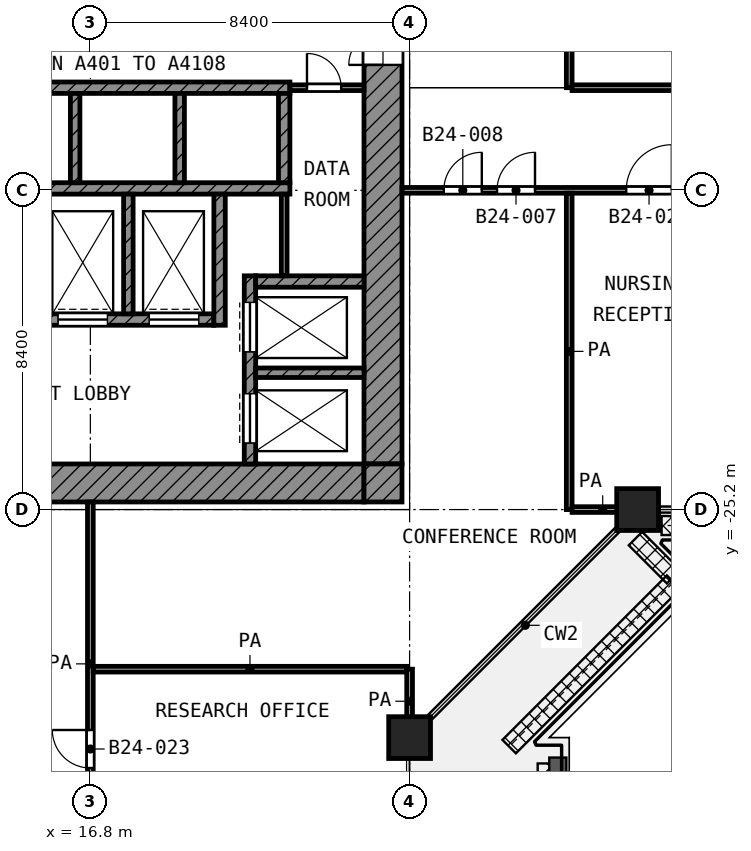
"""IFC4 building model, lengths in metres.
Left out: names, types, materials, properties, quantities, classifications, styles, units other than length and angle.
Written with IfcOpenShell. Run it as: python <this file> out.ifc"""

import sys

from ifc_helpers import new_model, si_unit, direction, frame, frame_2d, origin, origin_2d, place, context, subcontext, project, spatial, rectangle, extrude, element, fill, save


model = new_model("IFC4")
c1 = context("Model", 3, precision=1e-05, world=origin(), true_north=direction((0.0, 1.0)))
c2 = subcontext(c1, "Body", "Model", "MODEL_VIEW")
j1 = project(units=[si_unit("LENGTHUNIT", "METRE"), si_unit("PLANEANGLEUNIT", "RADIAN")], contexts=[c1])
p1 = place(None, origin())
s1 = spatial("IfcSite", under=j1, at=p1, CompositionType="ELEMENT")
p2 = place(p1, origin())
s2 = spatial("IfcBuilding", under=s1, at=p2, CompositionType="ELEMENT")
p3 = place(p2, frame((0.0, 0.0, 107.2)))
s3 = spatial("IfcBuildingStorey", under=s2, at=p3, CompositionType="ELEMENT", Elevation=107.2)
for number, where, z_axis, x_axis in (
    (1, (31.2, -25.2, 0.0), (0.0, 0.0, 1.0), (1.0, 0.0, 0.0)),
    (2, (25.2, -31.2, 0.0), (0.0, 0.0, 1.0), (1.0, 0.0, 0.0)),
):
    element("IfcColumn", number, at=place(p3, frame(where, z_axis=z_axis, x_axis=x_axis)), inside=s3, PredefinedType="COLUMN", context=c2, shape_type="SweptSolid", body=[
        extrude(rectangle(XDim=1.1, YDim=1.1, at=origin_2d()), origin(), (0.0, 0.0, 1.0), 4.2),
    ])
p4 = place(p3, frame((24.5, -24.0, 0.0), z_axis=(0.0, 0.0, 1.0), x_axis=(0.0, 1.0, 0.0)))
e3 = element("IfcWall", 3, at=p4, inside=s3, PredefinedType="SHEAR", context=c2, shape_type="SweptSolid", body=[
    extrude(rectangle(XDim=18.6, YDim=1.0, at=frame_2d((9.3, 0.0))), origin(), (0.0, 0.0, 1.0), 3.6),
])
p5 = place(p4, frame((10.5, 0.0, 0.0)))
e4 = element("IfcOpeningElement", 4, at=p5, cuts=e3, PredefinedType="OPENING", context=c2, shape_type="SweptSolid", body=[
    extrude(rectangle(XDim=1.8, YDim=2.1, at=frame_2d((0.9, 1.05))), frame((0.0, 0.51, 0.0), z_axis=(0.0, -1.0, 0.0), x_axis=(1.0, 0.0, 0.0)), (0.0, 0.0, 1.0), 1.02),
])
p6 = place(p3, frame((5.4, -24.5, 0.0), z_axis=(0.0, 0.0, 1.0), x_axis=(1.0, 0.0, 0.0)))
e5 = element("IfcWall", 5, at=p6, inside=s3, PredefinedType="SHEAR", context=c2, shape_type="SweptSolid", body=[
    extrude(rectangle(XDim=18.6, YDim=1.0, at=frame_2d((9.3, 0.0))), origin(), (0.0, 0.0, 1.0), 3.6),
])
p7 = place(p6, frame((6.3, 0.0, 0.0)))
e6 = element("IfcOpeningElement", 6, at=p7, cuts=e5, PredefinedType="OPENING", context=c2, shape_type="SweptSolid", body=[
    extrude(rectangle(XDim=1.8, YDim=2.1, at=frame_2d((0.9, 1.05))), frame((0.0, 0.51, 0.0), z_axis=(0.0, -1.0, 0.0), x_axis=(1.0, 0.0, 0.0)), (0.0, 0.0, 1.0), 1.02),
])
p8 = place(p3, frame((24.5, -25.0, 0.0), z_axis=(0.0, 0.0, 1.0), x_axis=(0.0, 1.0, 0.0)))
e7 = element("IfcWall", 7, at=p8, inside=s3, PredefinedType="SHEAR", context=c2, shape_type="SweptSolid", body=[
    extrude(rectangle(XDim=1.0, YDim=1.0, at=frame_2d((0.5, 0.0))), origin(), (0.0, 0.0, 1.0), 3.6),
])
for number, where, z_axis, x_axis in (
    (8, (5.4, -14.1, 0.0), (0.0, 0.0, 1.0), (1.0, 0.0, 0.0)),
    (9, (5.4, -16.75, 0.0), (0.0, 0.0, 1.0), (1.0, 0.0, 0.0)),
):
    element("IfcWall", number, at=place(p3, frame(where, z_axis=z_axis, x_axis=x_axis)), inside=s3, PredefinedType="SHEAR", context=c2, shape_type="SweptSolid", body=[
        extrude(rectangle(XDim=16.65, YDim=0.3, at=frame_2d((8.325, 0.0))), origin(), (0.0, 0.0, 1.0), 3.6),
    ])
p9 = place(p3, frame((5.4, -20.2, 0.0), z_axis=(0.0, 0.0, 1.0), x_axis=(1.0, 0.0, 0.0)))
e10 = element("IfcWall", 10, at=p9, inside=s3, PredefinedType="SHEAR", context=c2, shape_type="SweptSolid", body=[
    extrude(rectangle(XDim=14.65, YDim=0.3, at=frame_2d((7.325, 0.0))), origin(), (0.0, 0.0, 1.0), 3.6),
])
p10 = place(p9, frame((10.55, 0.0, 0.0)))
e11 = element("IfcOpeningElement", 11, at=p10, cuts=e10, PredefinedType="OPENING", context=c2, shape_type="SweptSolid", body=[
    extrude(rectangle(XDim=1.3, YDim=2.1, at=frame_2d((0.65, 1.05))), frame((0.0, 0.16, 0.0), z_axis=(0.0, -1.0, 0.0), x_axis=(1.0, 0.0, 0.0)), (0.0, 0.0, 1.0), 0.32),
])
p11 = place(p9, frame((12.95, 0.0, 0.0)))
e12 = element("IfcOpeningElement", 12, at=p11, cuts=e10, PredefinedType="OPENING", context=c2, shape_type="SweptSolid", body=[
    extrude(rectangle(XDim=1.3, YDim=2.1, at=frame_2d((0.65, 1.05))), frame((0.0, 0.16, 0.0), z_axis=(0.0, -1.0, 0.0), x_axis=(1.0, 0.0, 0.0)), (0.0, 0.0, 1.0), 0.32),
])
p12 = place(p9, frame((0.55, 0.0, 0.0)))
e13 = element("IfcOpeningElement", 13, at=p12, cuts=e10, PredefinedType="OPENING", context=c2, shape_type="SweptSolid", body=[
    extrude(rectangle(XDim=1.3, YDim=2.1, at=frame_2d((0.65, 1.05))), frame((0.0, 0.16, 0.0), z_axis=(0.0, -1.0, 0.0), x_axis=(1.0, 0.0, 0.0)), (0.0, 0.0, 1.0), 0.32),
])
p13 = place(p9, frame((2.95, 0.0, 0.0)))
e14 = element("IfcOpeningElement", 14, at=p13, cuts=e10, PredefinedType="OPENING", context=c2, shape_type="SweptSolid", body=[
    extrude(rectangle(XDim=1.3, YDim=2.1, at=frame_2d((0.65, 1.05))), frame((0.0, 0.16, 0.0), z_axis=(0.0, -1.0, 0.0), x_axis=(1.0, 0.0, 0.0)), (0.0, 0.0, 1.0), 0.32),
])
p14 = place(p9, frame((5.35, 0.0, 0.0)))
e15 = element("IfcOpeningElement", 15, at=p14, cuts=e10, PredefinedType="OPENING", context=c2, shape_type="SweptSolid", body=[
    extrude(rectangle(XDim=0.9, YDim=2.1, at=frame_2d((0.45, 1.05))), frame((0.0, 0.16, 0.0), z_axis=(0.0, -1.0, 0.0), x_axis=(1.0, 0.0, 0.0)), (0.0, 0.0, 1.0), 0.32),
])
p15 = place(p9, frame((7.75, 0.0, 0.0)))
e16 = element("IfcOpeningElement", 16, at=p15, cuts=e10, PredefinedType="OPENING", context=c2, shape_type="SweptSolid", body=[
    extrude(rectangle(XDim=0.9, YDim=2.1, at=frame_2d((0.45, 1.05))), frame((0.0, 0.16, 0.0), z_axis=(0.0, -1.0, 0.0), x_axis=(1.0, 0.0, 0.0)), (0.0, 0.0, 1.0), 0.32),
])
p16 = place(p3, frame((20.2, -20.35, 0.0), z_axis=(0.0, 0.0, 1.0), x_axis=(0.0, 1.0, 0.0)))
e17 = element("IfcWall", 17, at=p16, inside=s3, PredefinedType="SHEAR", context=c2, shape_type="SweptSolid", body=[
    extrude(rectangle(XDim=3.45, YDim=0.3, at=frame_2d((1.725, 0.0))), origin(), (0.0, 0.0, 1.0), 3.6),
])
p17 = place(p3, frame((21.9, -16.6, 0.0), z_axis=(0.0, 0.0, 1.0), x_axis=(0.0, 1.0, 0.0)))
e18 = element("IfcWall", 18, at=p17, inside=s3, PredefinedType="SHEAR", context=c2, shape_type="SweptSolid", body=[
    extrude(rectangle(XDim=2.35, YDim=0.3, at=frame_2d((1.175, 0.0))), origin(), (0.0, 0.0, 1.0), 3.6),
])
p18 = place(p3, frame((21.15, -19.2, 0.0), z_axis=(0.0, 0.0, 1.0), x_axis=(1.0, 0.0, 0.0)))
e19 = element("IfcWall", 19, at=p18, inside=s3, PredefinedType="SHEAR", context=c2, shape_type="SweptSolid", body=[
    extrude(rectangle(XDim=2.85, YDim=0.3, at=frame_2d((1.425, 0.0))), origin(), (0.0, 0.0, 1.0), 3.6),
])
p19 = place(p3, frame((21.0, -24.0, 0.0), z_axis=(0.0, 0.0, 1.0), x_axis=(0.0, 1.0, 0.0)))
e20 = element("IfcWall", 20, at=p19, inside=s3, PredefinedType="SHEAR", context=c2, shape_type="SweptSolid", body=[
    extrude(rectangle(XDim=4.95, YDim=0.3, at=frame_2d((2.475, 0.0))), origin(), (0.0, 0.0, 1.0), 3.6),
])
p20 = place(p19, frame((2.95, 0.0, 0.0)))
e21 = element("IfcOpeningElement", 21, at=p20, cuts=e20, PredefinedType="OPENING", context=c2, shape_type="SweptSolid", body=[
    extrude(rectangle(XDim=1.3, YDim=2.1, at=frame_2d((0.65, 1.05))), frame((0.0, 0.16, 0.0), z_axis=(0.0, -1.0, 0.0), x_axis=(1.0, 0.0, 0.0)), (0.0, 0.0, 1.0), 0.32),
])
p21 = place(p19, frame((0.55, 0.0, 0.0)))
e22 = element("IfcOpeningElement", 22, at=p21, cuts=e20, PredefinedType="OPENING", context=c2, shape_type="SweptSolid", body=[
    extrude(rectangle(XDim=1.3, YDim=2.1, at=frame_2d((0.65, 1.05))), frame((0.0, 0.16, 0.0), z_axis=(0.0, -1.0, 0.0), x_axis=(1.0, 0.0, 0.0)), (0.0, 0.0, 1.0), 0.32),
])
p22 = place(p3, frame((21.15, -21.6, 0.0), z_axis=(0.0, 0.0, 1.0), x_axis=(1.0, 0.0, 0.0)))
e23 = element("IfcWall", 23, at=p22, inside=s3, PredefinedType="SHEAR", context=c2, shape_type="SweptSolid", body=[
    extrude(rectangle(XDim=2.85, YDim=0.25, at=frame_2d((1.425, 0.0))), origin(), (0.0, 0.0, 1.0), 3.6),
])
p23 = place(p3, frame((17.8, -20.05, 0.0), z_axis=(0.0, 0.0, 1.0), x_axis=(0.0, 1.0, 0.0)))
e24 = element("IfcWall", 24, at=p23, inside=s3, PredefinedType="SHEAR", context=c2, shape_type="SweptSolid", body=[
    extrude(rectangle(XDim=3.15, YDim=0.25, at=frame_2d((1.575, 0.0))), origin(), (0.0, 0.0, 1.0), 3.6),
])
for number, where, z_axis, x_axis in (
    (25, (16.4, -16.6, 0.0), (0.0, 0.0, 1.0), (0.0, 1.0, 0.0)),
    (26, (19.15, -16.6, 0.0), (0.0, 0.0, 1.0), (0.0, 1.0, 0.0)),
):
    element("IfcWall", number, at=place(p3, frame(where, z_axis=z_axis, x_axis=x_axis)), inside=s3, PredefinedType="SHEAR", context=c2, shape_type="SweptSolid", body=[
        extrude(rectangle(XDim=2.35, YDim=0.25, at=frame_2d((1.175, 0.0))), origin(), (0.0, 0.0, 1.0), 3.6),
    ])
p24 = place(p3, frame((21.9, -19.05, 0.0), z_axis=(0.0, 0.0, 1.0), x_axis=(0.0, 1.0, 0.0)))
e27 = element("IfcWall", 27, at=p24, inside=s3, PredefinedType="PARTITIONING", context=c2, shape_type="SweptSolid", body=[
    extrude(rectangle(XDim=2.15, YDim=0.15, at=frame_2d((1.075, 0.0))), origin(), (0.0, 0.0, 1.0), 3.6),
])
p25 = place(p3, frame((22.05, -14.1, 0.0), z_axis=(0.0, 0.0, 1.0), x_axis=(1.0, 0.0, 0.0)))
e28 = element("IfcWall", 28, at=p25, inside=s3, PredefinedType="PARTITIONING", context=c2, shape_type="SweptSolid", body=[
    extrude(rectangle(XDim=1.95, YDim=0.15, at=frame_2d((0.975, 0.0))), origin(), (0.0, 0.0, 1.0), 3.6),
])
p26 = place(p25, frame((0.45, 0.0, 0.0)))
e29 = element("IfcOpeningElement", 29, at=p26, cuts=e28, PredefinedType="OPENING", context=c2, shape_type="SweptSolid", body=[
    extrude(rectangle(XDim=0.9, YDim=2.1, at=frame_2d((0.45, 1.05))), frame((0.0, 0.085, 0.0), z_axis=(0.0, -1.0, 0.0), x_axis=(1.0, 0.0, 0.0)), (0.0, 0.0, 1.0), 0.17),
])
p27 = place(p3, frame((16.875, -29.4, 0.0), z_axis=(0.0, 0.0, 1.0), x_axis=(1.0, 0.0, 0.0)))
e30 = element("IfcWall", 30, at=p27, inside=s3, PredefinedType="PARTITIONING", context=c2, shape_type="SweptSolid", body=[
    extrude(rectangle(XDim=8.25, YDim=0.15, at=frame_2d((4.125, 0.0))), origin(), (0.0, 0.0, 1.0), 3.6),
])
p28 = place(p3, frame((29.475, -25.2, 0.0), z_axis=(0.0, 0.0, 1.0), x_axis=(1.0, 0.0, 0.0)))
e31 = element("IfcWall", 31, at=p28, inside=s3, PredefinedType="PARTITIONING", context=c2, shape_type="SweptSolid", body=[
    extrude(rectangle(XDim=1.612, YDim=0.15, at=frame_2d((0.806, 0.0))), origin(), (0.0, 0.0, 1.0), 3.6),
])
p29 = place(p3, frame((25.0, -16.8, 0.0), z_axis=(0.0, 0.0, 1.0), x_axis=(1.0, 0.0, 0.0)))
e32 = element("IfcWall", 32, at=p29, inside=s3, PredefinedType="PARTITIONING", context=c2, shape_type="SweptSolid", body=[
    extrude(rectangle(XDim=54.72, YDim=0.15, at=frame_2d((27.36, 0.0))), origin(), (0.0, 0.0, 1.0), 3.6),
])
p30 = place(p29, frame((2.5, 0.0, 0.0)))
e33 = element("IfcOpeningElement", 33, at=p30, cuts=e32, PredefinedType="OPENING", context=c2, shape_type="SweptSolid", body=[
    extrude(rectangle(XDim=1.0, YDim=2.1, at=frame_2d((0.5, 1.05))), frame((0.0, 0.085, 0.0), z_axis=(0.0, -1.0, 0.0), x_axis=(1.0, 0.0, 0.0)), (0.0, 0.0, 1.0), 0.17),
])
p31 = place(p29, frame((1.1, 0.0, 0.0)))
e34 = element("IfcOpeningElement", 34, at=p31, cuts=e32, PredefinedType="OPENING", context=c2, shape_type="SweptSolid", body=[
    extrude(rectangle(XDim=1.0, YDim=2.1, at=frame_2d((0.5, 1.05))), frame((0.0, 0.085, 0.0), z_axis=(0.0, -1.0, 0.0), x_axis=(1.0, 0.0, 0.0)), (0.0, 0.0, 1.0), 0.17),
])
p32 = place(p29, frame((5.9, 0.0, 0.0)))
e35 = element("IfcOpeningElement", 35, at=p32, cuts=e32, PredefinedType="OPENING", context=c2, shape_type="SweptSolid", body=[
    extrude(rectangle(XDim=1.2, YDim=2.1, at=frame_2d((0.6, 1.05))), frame((0.0, 0.085, 0.0), z_axis=(0.0, -1.0, 0.0), x_axis=(1.0, 0.0, 0.0)), (0.0, 0.0, 1.0), 0.17),
])
p33 = place(p29, frame((10.05, 0.0, 0.0)))
e36 = element("IfcOpeningElement", 36, at=p33, cuts=e32, PredefinedType="OPENING", context=c2, shape_type="SweptSolid", body=[
    extrude(rectangle(XDim=1.0, YDim=2.1, at=frame_2d((0.5, 1.05))), frame((0.0, 0.085, 0.0), z_axis=(0.0, -1.0, 0.0), x_axis=(1.0, 0.0, 0.0)), (0.0, 0.0, 1.0), 0.17),
])
p34 = place(p29, frame((14.25, 0.0, 0.0)))
e37 = element("IfcOpeningElement", 37, at=p34, cuts=e32, PredefinedType="OPENING", context=c2, shape_type="SweptSolid", body=[
    extrude(rectangle(XDim=1.0, YDim=2.1, at=frame_2d((0.5, 1.05))), frame((0.0, 0.085, 0.0), z_axis=(0.0, -1.0, 0.0), x_axis=(1.0, 0.0, 0.0)), (0.0, 0.0, 1.0), 0.17),
])
p35 = place(p29, frame((18.75, 0.0, 0.0)))
e38 = element("IfcOpeningElement", 38, at=p35, cuts=e32, PredefinedType="OPENING", context=c2, shape_type="SweptSolid", body=[
    extrude(rectangle(XDim=1.0, YDim=2.1, at=frame_2d((0.5, 1.05))), frame((0.0, 0.085, 0.0), z_axis=(0.0, -1.0, 0.0), x_axis=(1.0, 0.0, 0.0)), (0.0, 0.0, 1.0), 0.17),
])
p36 = place(p29, frame((22.95, 0.0, 0.0)))
e39 = element("IfcOpeningElement", 39, at=p36, cuts=e32, PredefinedType="OPENING", context=c2, shape_type="SweptSolid", body=[
    extrude(rectangle(XDim=1.0, YDim=2.1, at=frame_2d((0.5, 1.05))), frame((0.0, 0.085, 0.0), z_axis=(0.0, -1.0, 0.0), x_axis=(1.0, 0.0, 0.0)), (0.0, 0.0, 1.0), 0.17),
])
p37 = place(p29, frame((26.7, 0.0, 0.0)))
e40 = element("IfcOpeningElement", 40, at=p37, cuts=e32, PredefinedType="OPENING", context=c2, shape_type="SweptSolid", body=[
    extrude(rectangle(XDim=1.0, YDim=2.1, at=frame_2d((0.5, 1.05))), frame((0.0, 0.085, 0.0), z_axis=(0.0, -1.0, 0.0), x_axis=(1.0, 0.0, 0.0)), (0.0, 0.0, 1.0), 0.17),
])
p38 = place(p29, frame((30.9, 0.0, 0.0)))
e41 = element("IfcOpeningElement", 41, at=p38, cuts=e32, PredefinedType="OPENING", context=c2, shape_type="SweptSolid", body=[
    extrude(rectangle(XDim=1.0, YDim=2.1, at=frame_2d((0.5, 1.05))), frame((0.0, 0.085, 0.0), z_axis=(0.0, -1.0, 0.0), x_axis=(1.0, 0.0, 0.0)), (0.0, 0.0, 1.0), 0.17),
])
p39 = place(p29, frame((35.4, 0.0, 0.0)))
e42 = element("IfcOpeningElement", 42, at=p39, cuts=e32, PredefinedType="OPENING", context=c2, shape_type="SweptSolid", body=[
    extrude(rectangle(XDim=1.0, YDim=2.1, at=frame_2d((0.5, 1.05))), frame((0.0, 0.085, 0.0), z_axis=(0.0, -1.0, 0.0), x_axis=(1.0, 0.0, 0.0)), (0.0, 0.0, 1.0), 0.17),
])
p40 = place(p29, frame((48.7, 0.0, 0.0)))
e43 = element("IfcOpeningElement", 43, at=p40, cuts=e32, PredefinedType="OPENING", context=c2, shape_type="SweptSolid", body=[
    extrude(rectangle(XDim=1.0, YDim=2.1, at=frame_2d((0.5, 1.05))), frame((0.0, 0.085, 0.0), z_axis=(0.0, -1.0, 0.0), x_axis=(1.0, 0.0, 0.0)), (0.0, 0.0, 1.0), 0.17),
])
p41 = place(p29, frame((43.1, 0.0, 0.0)))
e44 = element("IfcOpeningElement", 44, at=p41, cuts=e32, PredefinedType="OPENING", context=c2, shape_type="SweptSolid", body=[
    extrude(rectangle(XDim=1.0, YDim=2.1, at=frame_2d((0.5, 1.05))), frame((0.0, 0.085, 0.0), z_axis=(0.0, -1.0, 0.0), x_axis=(1.0, 0.0, 0.0)), (0.0, 0.0, 1.0), 0.17),
])
p42 = place(p3, frame((29.475, -14.1, 0.0), z_axis=(0.0, 0.0, 1.0), x_axis=(1.0, 0.0, 0.0)))
e45 = element("IfcWall", 45, at=p42, inside=s3, PredefinedType="PARTITIONING", context=c2, shape_type="SweptSolid", body=[
    extrude(rectangle(XDim=10.632, YDim=0.15, at=frame_2d((5.316, 0.0))), origin(), (0.0, 0.0, 1.0), 3.6),
])
p43 = place(p3, frame((16.8, -33.52, 0.0), z_axis=(0.0, 0.0, 1.0), x_axis=(0.0, 1.0, 0.0)))
e46 = element("IfcWall", 46, at=p43, inside=s3, PredefinedType="PARTITIONING", context=c2, shape_type="SweptSolid", body=[
    extrude(rectangle(XDim=8.52, YDim=0.15, at=frame_2d((4.26, 0.0))), origin(), (0.0, 0.0, 1.0), 3.6),
])
p44 = place(p43, frame((1.52, 0.0, 0.0)))
e47 = element("IfcOpeningElement", 47, at=p44, cuts=e46, PredefinedType="OPENING", context=c2, shape_type="SweptSolid", body=[
    extrude(rectangle(XDim=1.0, YDim=2.1, at=frame_2d((0.5, 1.05))), frame((0.0, 0.085, 0.0), z_axis=(0.0, -1.0, 0.0), x_axis=(1.0, 0.0, 0.0)), (0.0, 0.0, 1.0), 0.17),
])
p45 = place(p3, frame((25.2, -31.087, 0.0), z_axis=(0.0, 0.0, 1.0), x_axis=(0.0, 1.0, 0.0)))
e48 = element("IfcWall", 48, at=p45, inside=s3, PredefinedType="PARTITIONING", context=c2, shape_type="SweptSolid", body=[
    extrude(rectangle(XDim=1.687, YDim=0.15, at=frame_2d((0.844, 0.0))), origin(), (0.0, 0.0, 1.0), 3.6),
])
p46 = place(p3, frame((29.4, -25.2, 0.0), z_axis=(0.0, 0.0, 1.0), x_axis=(0.0, 1.0, 0.0)))
e49 = element("IfcWall", 49, at=p46, inside=s3, PredefinedType="PARTITIONING", context=c2, shape_type="SweptSolid", body=[
    extrude(rectangle(XDim=8.325, YDim=0.15, at=frame_2d((4.163, 0.0))), origin(), (0.0, 0.0, 1.0), 3.6),
])
p47 = place(p3, frame((29.4, -14.1, 0.0), z_axis=(0.0, 0.0, 1.0), x_axis=(0.0, 1.0, 0.0)))
e50 = element("IfcWall", 50, at=p47, inside=s3, PredefinedType="PARTITIONING", context=c2, shape_type="SweptSolid", body=[
    extrude(rectangle(XDim=14.098, YDim=0.15, at=frame_2d((7.049, 0.0))), origin(), (0.0, 0.0, 1.0), 3.6),
])
p48 = place(p20, origin())
e51 = element("IfcDoor", 51, at=p48, inside=s3, OperationType="DOUBLE_DOOR_SLIDING", PredefinedType="DOOR", context=c2, shape_type="SweptSolid", body=[
    extrude(rectangle(XDim=1.3, YDim=2.1, at=frame_2d((0.65, 1.05))), frame((0.0, 0.025, 0.0), z_axis=(0.0, -1.0, 0.0), x_axis=(1.0, 0.0, 0.0)), (0.0, 0.0, 1.0), 0.05),
])
fill(e21, e51)
p49 = place(p21, origin())
e52 = element("IfcDoor", 52, at=p49, inside=s3, OperationType="DOUBLE_DOOR_SLIDING", PredefinedType="DOOR", context=c2, shape_type="SweptSolid", body=[
    extrude(rectangle(XDim=1.3, YDim=2.1, at=frame_2d((0.65, 1.05))), frame((0.0, 0.025, 0.0), z_axis=(0.0, -1.0, 0.0), x_axis=(1.0, 0.0, 0.0)), (0.0, 0.0, 1.0), 0.05),
])
fill(e22, e52)
p50 = place(p10, origin())
e53 = element("IfcDoor", 53, at=p50, inside=s3, OperationType="DOUBLE_DOOR_SLIDING", PredefinedType="DOOR", context=c2, shape_type="SweptSolid", body=[
    extrude(rectangle(XDim=1.3, YDim=2.1, at=frame_2d((0.65, 1.05))), frame((0.0, 0.025, 0.0), z_axis=(0.0, -1.0, 0.0), x_axis=(1.0, 0.0, 0.0)), (0.0, 0.0, 1.0), 0.05),
])
fill(e11, e53)
p51 = place(p11, origin())
e54 = element("IfcDoor", 54, at=p51, inside=s3, OperationType="DOUBLE_DOOR_SLIDING", PredefinedType="DOOR", context=c2, shape_type="SweptSolid", body=[
    extrude(rectangle(XDim=1.3, YDim=2.1, at=frame_2d((0.65, 1.05))), frame((0.0, 0.025, 0.0), z_axis=(0.0, -1.0, 0.0), x_axis=(1.0, 0.0, 0.0)), (0.0, 0.0, 1.0), 0.05),
])
fill(e12, e54)
p52 = place(p5, origin())
e55 = element("IfcDoor", 55, at=p52, inside=s3, OperationType="DOUBLE_DOOR_SINGLE_SWING", PredefinedType="DOOR", context=c2, shape_type="SweptSolid", body=[
    extrude(rectangle(XDim=1.8, YDim=2.1, at=frame_2d((0.9, 1.05))), frame((0.0, 0.025, 0.0), z_axis=(0.0, -1.0, 0.0), x_axis=(1.0, 0.0, 0.0)), (0.0, 0.0, 1.0), 0.05),
])
fill(e4, e55)
p53 = place(p26, origin())
e56 = element("IfcDoor", 56, at=p53, inside=s3, OperationType="SINGLE_SWING_LEFT", PredefinedType="DOOR", context=c2, shape_type="SweptSolid", body=[
    extrude(rectangle(XDim=0.9, YDim=2.1, at=frame_2d((0.45, 1.05))), frame((0.0, 0.025, 0.0), z_axis=(0.0, -1.0, 0.0), x_axis=(1.0, 0.0, 0.0)), (0.0, 0.0, 1.0), 0.05),
])
fill(e29, e56)
p54 = place(p30, origin())
e57 = element("IfcDoor", 57, at=p54, inside=s3, OperationType="SINGLE_SWING_RIGHT", PredefinedType="DOOR", context=c2, shape_type="SweptSolid", body=[
    extrude(rectangle(XDim=1.0, YDim=2.1, at=frame_2d((0.5, 1.05))), frame((0.0, 0.025, 0.0), z_axis=(0.0, -1.0, 0.0), x_axis=(1.0, 0.0, 0.0)), (0.0, 0.0, 1.0), 0.05),
])
fill(e33, e57)
p55 = place(p31, origin())
e58 = element("IfcDoor", 58, at=p55, inside=s3, OperationType="SINGLE_SWING_RIGHT", PredefinedType="DOOR", context=c2, shape_type="SweptSolid", body=[
    extrude(rectangle(XDim=1.0, YDim=2.1, at=frame_2d((0.5, 1.05))), frame((0.0, 0.025, 0.0), z_axis=(0.0, -1.0, 0.0), x_axis=(1.0, 0.0, 0.0)), (0.0, 0.0, 1.0), 0.05),
])
fill(e34, e58)
p56 = place(p32, origin())
e59 = element("IfcDoor", 59, at=p56, inside=s3, OperationType="SINGLE_SWING_RIGHT", PredefinedType="DOOR", context=c2, shape_type="SweptSolid", body=[
    extrude(rectangle(XDim=1.2, YDim=2.1, at=frame_2d((0.6, 1.05))), frame((0.0, 0.025, 0.0), z_axis=(0.0, -1.0, 0.0), x_axis=(1.0, 0.0, 0.0)), (0.0, 0.0, 1.0), 0.05),
])
fill(e35, e59)
p57 = place(p44, origin())
e60 = element("IfcDoor", 60, at=p57, inside=s3, OperationType="SINGLE_SWING_RIGHT", PredefinedType="DOOR", context=c2, shape_type="SweptSolid", body=[
    extrude(rectangle(XDim=1.0, YDim=2.1, at=frame_2d((0.5, 1.05))), frame((0.0, 0.025, 0.0), z_axis=(0.0, -1.0, 0.0), x_axis=(1.0, 0.0, 0.0)), (0.0, 0.0, 1.0), 0.05),
])
fill(e47, e60)
save(model, sys.argv[1])
